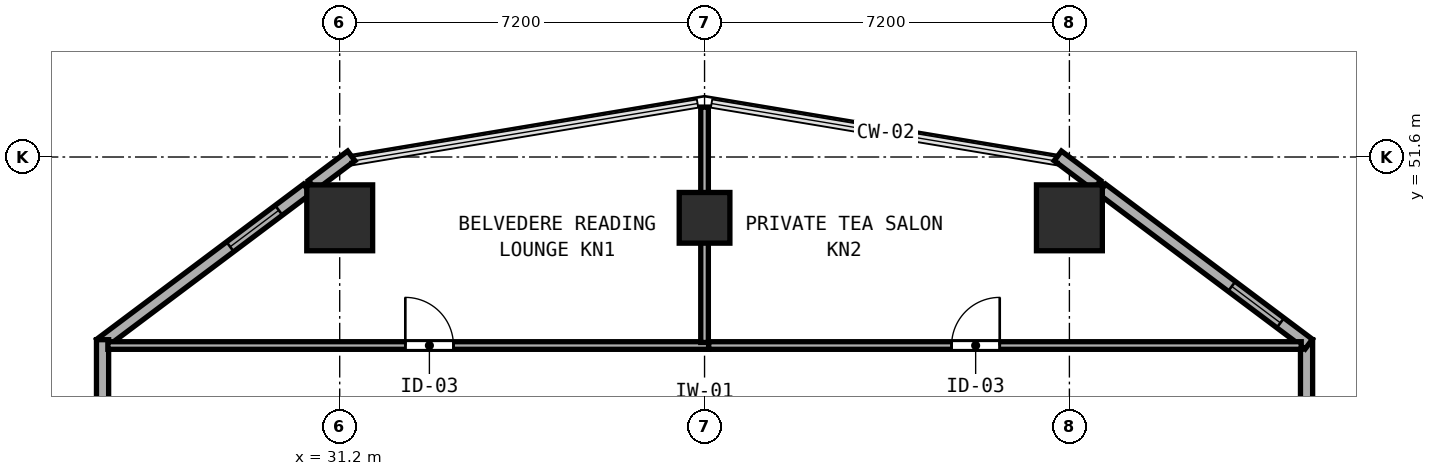
"""IFC4 building model, lengths in metres.
Left out: names, types, materials, properties, quantities, classifications, styles, units other than length and angle.
Written with IfcOpenShell. Run it as: python <this file> out.ifc"""

import sys

from ifc_helpers import new_model, si_unit, direction, frame, frame_2d, origin, origin_2d, place, context, subcontext, project, spatial, rectangle, hollow_rectangle, extrude, element, fill, save


model = new_model("IFC4")
c1 = context("Model", 3, precision=1e-05, world=origin(), true_north=direction((0.0, 1.0)))
c2 = subcontext(c1, "Body", "Model", "MODEL_VIEW")
j1 = project(units=[si_unit("LENGTHUNIT", "METRE"), si_unit("PLANEANGLEUNIT", "RADIAN")], contexts=[c1])
p1 = place(None, origin())
s1 = spatial("IfcSite", under=j1, at=p1, CompositionType="ELEMENT")
p2 = place(p1, origin())
s2 = spatial("IfcBuilding", under=s1, at=p2, CompositionType="ELEMENT")
p3 = place(p2, frame((0.0, 0.0, 35.4)))
s3 = spatial("IfcBuildingStorey", under=s2, at=p3, CompositionType="ELEMENT", Elevation=35.4)
for number, where, z_axis, x_axis in (
    (1, (31.2, 50.4, 0.0), (0.0, 0.0, 1.0), (1.0, 0.0, 0.0)),
    (2, (45.6, 50.4, 0.0), (0.0, 0.0, 1.0), (1.0, 0.0, 0.0)),
):
    element("IfcColumn", number, at=place(p3, frame(where, z_axis=z_axis, x_axis=x_axis)), inside=s3, PredefinedType="COLUMN", context=c2, shape_type="SweptSolid", body=[
        extrude(hollow_rectangle(XDim=1.3, YDim=1.3, WallThickness=0.048, at=origin_2d()), origin(), (0.0, 0.0, 1.0), 3.8),
    ])
p4 = place(p3, frame((38.4, 50.4, 0.0), z_axis=(0.0, 0.0, 1.0), x_axis=(1.0, 0.0, 0.0)))
e3 = element("IfcColumn", 3, at=p4, inside=s3, PredefinedType="COLUMN", context=c2, shape_type="SweptSolid", body=[
    extrude(hollow_rectangle(XDim=1.0, YDim=1.0, WallThickness=0.038, at=origin_2d()), origin(), (0.0, 0.0, 1.0), 3.8),
])
p5 = place(p3, frame((50.28, 46.625, 0.0), z_axis=(0.0, 0.0, 1.0), x_axis=(0.0, 1.0, 0.0)))
e4 = element("IfcWall", 4, at=p5, inside=s3, PredefinedType="SOLIDWALL", context=c2, shape_type="SweptSolid", body=[
    extrude(rectangle(XDim=1.37, YDim=0.24, at=frame_2d((0.685, 0.0))), origin(), (0.0, 0.0, 1.0), 3.6),
])
p6 = place(p3, frame((50.324, 47.907, 0.0), z_axis=(0.0, 0.0, 1.0), x_axis=(-0.8, 0.6, 0.0)))
e5 = element("IfcWall", 5, at=p6, inside=s3, PredefinedType="SOLIDWALL", context=c2, shape_type="SweptSolid", body=[
    extrude(rectangle(XDim=5.103, YDim=0.24, at=frame_2d((2.551, 0.0))), origin(), (0.0, 0.0, 1.0), 3.6),
])
p7 = place(p6, frame((0.7, 0.0, 0.85)))
e6 = element("IfcOpeningElement", 6, at=p7, cuts=e5, PredefinedType="OPENING", context=c2, shape_type="SweptSolid", body=[
    extrude(rectangle(XDim=1.2, YDim=1.85, at=frame_2d((0.6, 0.925))), frame((0.0, 0.13, 0.0), z_axis=(0.0, -1.0, 0.0), x_axis=(1.0, 0.0, 0.0)), (0.0, 0.0, 1.0), 0.26),
])
p8 = place(p3, frame((46.144, 51.042, 0.0), z_axis=(0.0, 0.0, 1.0), x_axis=(-0.8, 0.6, 0.0)))
e7 = element("IfcWall", 7, at=p8, inside=s3, PredefinedType="SOLIDWALL", context=c2, shape_type="SweptSolid", body=[
    extrude(rectangle(XDim=0.966, YDim=0.24, at=frame_2d((0.483, 0.0))), origin(), (0.0, 0.0, 1.0), 3.6),
])
p9 = place(p3, frame((31.429, 51.621, 0.0), z_axis=(0.0, 0.0, 1.0), x_axis=(-0.800090996409, -0.599878652284, 0.0)))
e8 = element("IfcWall", 8, at=p9, inside=s3, PredefinedType="SOLIDWALL", context=c2, shape_type="SweptSolid", body=[
    extrude(rectangle(XDim=0.966, YDim=0.24, at=frame_2d((0.483, 0.0))), origin(), (0.0, 0.0, 1.0), 3.6),
])
p10 = place(p3, frame((30.558, 50.969, 0.0), z_axis=(0.0, 0.0, 1.0), x_axis=(-0.8, -0.6, 0.0)))
e9 = element("IfcWall", 9, at=p10, inside=s3, PredefinedType="SOLIDWALL", context=c2, shape_type="SweptSolid", body=[
    extrude(rectangle(XDim=5.103, YDim=0.24, at=frame_2d((2.551, 0.0))), origin(), (0.0, 0.0, 1.0), 3.6),
])
p11 = place(p10, frame((0.7, 0.0, 0.85)))
e10 = element("IfcOpeningElement", 10, at=p11, cuts=e9, PredefinedType="OPENING", context=c2, shape_type="SweptSolid", body=[
    extrude(rectangle(XDim=1.2, YDim=1.85, at=frame_2d((0.6, 0.925))), frame((0.0, 0.13, 0.0), z_axis=(0.0, -1.0, 0.0), x_axis=(1.0, 0.0, 0.0)), (0.0, 0.0, 1.0), 0.26),
])
p12 = place(p3, frame((26.52, 47.995, 0.0), z_axis=(0.0, 0.0, 1.0), x_axis=(0.0, -1.0, 0.0)))
e11 = element("IfcWall", 11, at=p12, inside=s3, PredefinedType="SOLIDWALL", context=c2, shape_type="SweptSolid", body=[
    extrude(rectangle(XDim=1.37, YDim=0.24, at=frame_2d((0.685, 0.0))), origin(), (0.0, 0.0, 1.0), 3.6),
])
p13 = place(p3, frame((26.625, 47.88, 0.0), z_axis=(0.0, 0.0, 1.0), x_axis=(1.0, 0.0, 0.0)))
e12 = element("IfcWall", 12, at=p13, inside=s3, PredefinedType="PARTITIONING", context=c2, shape_type="SweptSolid", body=[
    extrude(rectangle(XDim=11.855, YDim=0.15, at=frame_2d((5.927, 0.0))), origin(), (0.0, 0.0, 1.0), 3.6),
])
p14 = place(p13, frame((5.87, 0.0, 0.0)))
e13 = element("IfcOpeningElement", 13, at=p14, cuts=e12, PredefinedType="OPENING", context=c2, shape_type="SweptSolid", body=[
    extrude(rectangle(XDim=0.95, YDim=2.12, at=frame_2d((0.475, 1.06))), frame((0.0, 0.085, 0.0), z_axis=(0.0, -1.0, 0.0), x_axis=(1.0, 0.0, 0.0)), (0.0, 0.0, 1.0), 0.17),
])
p15 = place(p3, frame((38.4, 47.94, 0.0), z_axis=(0.0, 0.0, 1.0), x_axis=(0.0, 1.0, 0.0)))
e14 = element("IfcWall", 14, at=p15, inside=s3, PredefinedType="PARTITIONING", context=c2, shape_type="SweptSolid", body=[
    extrude(rectangle(XDim=4.645, YDim=0.15, at=frame_2d((2.323, 0.0))), origin(), (0.0, 0.0, 1.0), 3.6),
])
p16 = place(p3, frame((38.482, 47.88, 0.0), z_axis=(0.0, 0.0, 1.0), x_axis=(1.0, 0.0, 0.0)))
e15 = element("IfcWall", 15, at=p16, inside=s3, PredefinedType="PARTITIONING", context=c2, shape_type="SweptSolid", body=[
    extrude(rectangle(XDim=11.693, YDim=0.15, at=frame_2d((5.847, 0.0))), origin(), (0.0, 0.0, 1.0), 3.6),
])
p17 = place(p16, frame((4.793, 0.0, 0.0)))
e16 = element("IfcOpeningElement", 16, at=p17, cuts=e15, PredefinedType="OPENING", context=c2, shape_type="SweptSolid", body=[
    extrude(rectangle(XDim=0.95, YDim=2.12, at=frame_2d((0.475, 1.06))), frame((0.0, 0.085, 0.0), z_axis=(0.0, -1.0, 0.0), x_axis=(1.0, 0.0, 0.0)), (0.0, 0.0, 1.0), 0.17),
])
p18 = place(p7, origin())
e17 = element("IfcWindow", 17, at=p18, inside=s3, PartitioningType="SINGLE_PANEL", PredefinedType="WINDOW", context=c2, shape_type="SweptSolid", body=[
    extrude(rectangle(XDim=1.2, YDim=1.85, at=frame_2d((0.6, 0.925))), frame((0.0, 0.03, 0.0), z_axis=(0.0, -1.0, 0.0), x_axis=(1.0, 0.0, 0.0)), (0.0, 0.0, 1.0), 0.06),
])
fill(e6, e17)
p19 = place(p11, origin())
e18 = element("IfcWindow", 18, at=p19, inside=s3, PartitioningType="SINGLE_PANEL", PredefinedType="WINDOW", context=c2, shape_type="SweptSolid", body=[
    extrude(rectangle(XDim=1.2, YDim=1.85, at=frame_2d((0.6, 0.925))), frame((0.0, 0.03, 0.0), z_axis=(0.0, -1.0, 0.0), x_axis=(1.0, 0.0, 0.0)), (0.0, 0.0, 1.0), 0.06),
])
fill(e10, e18)
p20 = place(p14, origin())
e19 = element("IfcDoor", 19, at=p20, inside=s3, OperationType="SINGLE_SWING_LEFT", PredefinedType="DOOR", context=c2, shape_type="SweptSolid", body=[
    extrude(rectangle(XDim=0.95, YDim=2.12, at=frame_2d((0.475, 1.06))), frame((0.0, 0.025, 0.0), z_axis=(0.0, -1.0, 0.0), x_axis=(1.0, 0.0, 0.0)), (0.0, 0.0, 1.0), 0.05),
])
fill(e13, e19)
p21 = place(p17, origin())
e20 = element("IfcDoor", 20, at=p21, inside=s3, OperationType="SINGLE_SWING_RIGHT", PredefinedType="DOOR", context=c2, shape_type="SweptSolid", body=[
    extrude(rectangle(XDim=0.95, YDim=2.12, at=frame_2d((0.475, 1.06))), frame((0.0, 0.025, 0.0), z_axis=(0.0, -1.0, 0.0), x_axis=(1.0, 0.0, 0.0)), (0.0, 0.0, 1.0), 0.05),
])
fill(e16, e20)
save(model, sys.argv[1])
